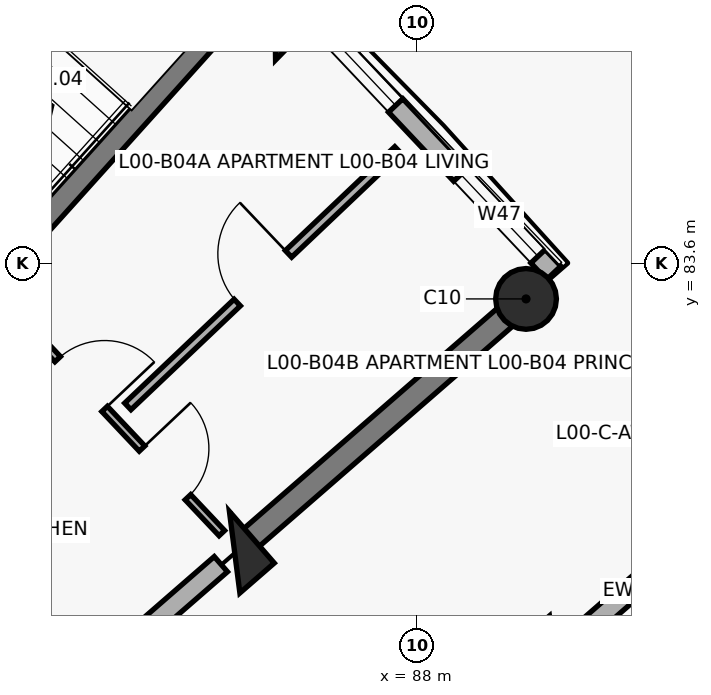
"""IFC4 building model, lengths in metres.
Left out: names, types, materials, properties, quantities, classifications, styles, units other than length and angle.
Written with IfcOpenShell. Run it as: python <this file> out.ifc"""

import sys

from ifc_helpers import new_model, si_unit, direction, frame, frame_2d, origin, origin_2d, place, context, subcontext, project, spatial, rectangle, circle, extrude, element, fill, save


model = new_model("IFC4")
c1 = context("Model", 3, precision=1e-05, world=origin(), true_north=direction((0.0, 1.0)))
c2 = subcontext(c1, "Body", "Model", "MODEL_VIEW")
j1 = project(units=[si_unit("LENGTHUNIT", "METRE"), si_unit("PLANEANGLEUNIT", "RADIAN")], contexts=[c1])
p1 = place(None, origin())
s1 = spatial("IfcSite", under=j1, at=p1, CompositionType="ELEMENT")
p2 = place(p1, origin())
s2 = spatial("IfcBuilding", under=s1, at=p2, CompositionType="ELEMENT")
p3 = place(p2, origin())
s3 = spatial("IfcBuildingStorey", under=s2, at=p3, CompositionType="ELEMENT", Elevation=0.0)
p4 = place(p3, frame((86.137, 86.626, 0.0), z_axis=(0.0, 0.0, 1.0), x_axis=(0.698665066769, 0.715448897181, 0.0)))
e1 = element("IfcColumn", 1, at=p4, inside=s3, PredefinedType="COLUMN", context=c2, shape_type="SweptSolid", body=[
    extrude(rectangle(XDim=0.5, YDim=0.5, at=origin_2d()), origin(), (0.0, 0.0, 1.0), 4.5),
])
p5 = place(p3, frame((85.603, 79.796, 0.0), z_axis=(0.0, 0.0, 1.0), x_axis=(0.754709580223, 0.656059028991, 0.0)))
e2 = element("IfcColumn", 2, at=p5, inside=s3, PredefinedType="COLUMN", context=c2, shape_type="SweptSolid", body=[
    extrude(rectangle(XDim=0.6, YDim=0.9, at=origin_2d()), origin(), (0.0, 0.0, 1.0), 4.5),
])
p6 = place(p3, frame((89.437, 83.129, 0.0), z_axis=(0.0, 0.0, 1.0), x_axis=(0.754709580223, 0.656059028991, 0.0)))
e3 = element("IfcColumn", 3, at=p6, inside=s3, PredefinedType="COLUMN", context=c2, shape_type="SweptSolid", body=[
    extrude(circle(Radius=0.4, at=origin_2d()), origin(), (0.0, 0.0, 1.0), 4.5),
])
p7 = place(p3, frame((85.739, 79.914, 0.0), z_axis=(0.0, 0.0, 1.0), x_axis=(0.754703505217, 0.65606601742, 0.0)))
e4 = element("IfcWall", 4, at=p7, inside=s3, PredefinedType="SHEAR", context=c2, shape_type="SweptSolid", body=[
    extrude(rectangle(XDim=4.72, YDim=0.31, at=frame_2d((2.36, 0.0))), origin(), (0.0, 0.0, 1.0), 4.26),
])
p8 = place(p3, frame((86.5, 86.969, 0.0), z_axis=(0.0, 0.0, 1.0), x_axis=(0.686350671901, -0.727270757821, 0.0)))
e5 = element("IfcWall", 5, at=p8, inside=s3, PredefinedType="SOLIDWALL", context=c2, shape_type="SweptSolid", body=[
    extrude(rectangle(XDim=4.809, YDim=0.258, at=frame_2d((2.404, 0.0))), origin(), (0.0, 0.0, 1.0), 3.45),
])
p9 = place(p8, frame((0.3, 0.0, 0.3)))
e6 = element("IfcOpeningElement", 6, at=p9, cuts=e5, PredefinedType="OPENING", context=c2, shape_type="SweptSolid", body=[
    extrude(rectangle(XDim=1.48, YDim=1.42, at=frame_2d((0.74, 0.71))), frame((0.0, 0.139, 0.0), z_axis=(0.0, -1.0, 0.0), x_axis=(1.0, 0.0, 0.0)), (0.0, 0.0, 1.0), 0.278),
])
p10 = place(p8, frame((3.029, 0.0, 0.3)))
e7 = element("IfcOpeningElement", 7, at=p10, cuts=e5, PredefinedType="OPENING", context=c2, shape_type="SweptSolid", body=[
    extrude(rectangle(XDim=1.48, YDim=1.42, at=frame_2d((0.74, 0.71))), frame((0.0, 0.139, 0.0), z_axis=(0.0, -1.0, 0.0), x_axis=(1.0, 0.0, 0.0)), (0.0, 0.0, 1.0), 0.278),
])
p11 = place(p3, frame((79.234, 74.259, 0.0), z_axis=(0.0, 0.0, 1.0), x_axis=(0.754717680958, 0.656049710044, 0.0)))
e8 = element("IfcWall", 8, at=p11, inside=s3, PredefinedType="SOLIDWALL", context=c2, shape_type="SweptSolid", body=[
    extrude(rectangle(XDim=8.2, YDim=0.265, at=frame_2d((4.1, 0.0))), origin(), (0.0, 0.0, 1.0), 3.34),
])
p12 = place(p11, frame((3.49, 0.0, 0.0)))
e9 = element("IfcOpeningElement", 9, at=p12, cuts=e8, PredefinedType="OPENING", context=c2, shape_type="SweptSolid", body=[
    extrude(rectangle(XDim=1.5, YDim=2.2, at=frame_2d((0.75, 1.1))), frame((0.0, 0.142, 0.0), z_axis=(0.0, -1.0, 0.0), x_axis=(1.0, 0.0, 0.0)), (0.0, 0.0, 1.0), 0.285),
])
p13 = place(p3, frame((91.746, 80.101, 0.0), z_axis=(0.0, 0.0, 1.0), x_axis=(-0.754704866158, -0.656064451862, 0.0)))
e10 = element("IfcWall", 10, at=p13, inside=s3, PredefinedType="SOLIDWALL", context=c2, shape_type="SweptSolid", body=[
    extrude(rectangle(XDim=8.2, YDim=0.265, at=frame_2d((4.1, 0.0))), origin(), (0.0, 0.0, 1.0), 3.34),
])
p14 = place(p13, frame((3.49, 0.0, 0.0)))
e11 = element("IfcOpeningElement", 11, at=p14, cuts=e10, PredefinedType="OPENING", context=c2, shape_type="SweptSolid", body=[
    extrude(rectangle(XDim=1.5, YDim=2.2, at=frame_2d((0.75, 1.1))), frame((0.0, 0.142, 0.0), z_axis=(0.0, -1.0, 0.0), x_axis=(1.0, 0.0, 0.0)), (0.0, 0.0, 1.0), 0.285),
])
p15 = place(p3, frame((80.309, 81.073, 0.0), z_axis=(0.0, 0.0, 1.0), x_axis=(0.668885797871, 0.743365179038, 0.0)))
e12 = element("IfcWall", 12, at=p15, inside=s3, PredefinedType="SHEAR", context=c2, shape_type="SweptSolid", body=[
    extrude(rectangle(XDim=7.69, YDim=0.3, at=frame_2d((3.845, 0.0))), origin(), (0.0, 0.0, 1.0), 4.5),
])
p16 = place(p3, frame((82.829, 82.809, 0.0), z_axis=(0.0, 0.0, 1.0), x_axis=(0.686300649561, -0.727317962388, 0.0)))
e13 = element("IfcWall", 13, at=p16, inside=s3, PredefinedType="PARTITIONING", context=c2, shape_type="SweptSolid", body=[
    extrude(rectangle(XDim=3.797, YDim=0.1, at=frame_2d((1.899, 0.0))), origin(), (0.0, 0.0, 1.0), 3.34),
])
p17 = place(p16, frame((0.65, 0.0, 0.0)))
e14 = element("IfcOpeningElement", 14, at=p17, cuts=e13, PredefinedType="OPENING", context=c2, shape_type="SweptSolid", body=[
    extrude(rectangle(XDim=0.9, YDim=2.1, at=frame_2d((0.45, 1.05))), frame((0.0, 0.06, 0.0), z_axis=(0.0, -1.0, 0.0), x_axis=(1.0, 0.0, 0.0)), (0.0, 0.0, 1.0), 0.12),
])
p18 = place(p16, frame((2.267, 0.0, 0.0)))
e15 = element("IfcOpeningElement", 15, at=p18, cuts=e13, PredefinedType="OPENING", context=c2, shape_type="SweptSolid", body=[
    extrude(rectangle(XDim=0.88, YDim=2.1, at=frame_2d((0.44, 1.05))), frame((0.0, 0.06, 0.0), z_axis=(0.0, -1.0, 0.0), x_axis=(1.0, 0.0, 0.0)), (0.0, 0.0, 1.0), 0.12),
])
p19 = place(p3, frame((84.198, 81.714, 0.0), z_axis=(0.0, 0.0, 1.0), x_axis=(0.725204659953, 0.688533369694, 0.0)))
e16 = element("IfcWall", 16, at=p19, inside=s3, PredefinedType="PARTITIONING", context=c2, shape_type="SweptSolid", body=[
    extrude(rectangle(XDim=4.9, YDim=0.12, at=frame_2d((2.45, 0.0))), origin(), (0.0, 0.0, 1.0), 3.34),
])
p20 = place(p19, frame((1.985, 0.0, 0.0)))
e17 = element("IfcOpeningElement", 17, at=p20, cuts=e16, PredefinedType="OPENING", context=c2, shape_type="SweptSolid", body=[
    extrude(rectangle(XDim=0.93, YDim=2.1, at=frame_2d((0.465, 1.05))), frame((0.0, 0.07, 0.0), z_axis=(0.0, -1.0, 0.0), x_axis=(1.0, 0.0, 0.0)), (0.0, 0.0, 1.0), 0.14),
])
p21 = place(p9, origin())
e18 = element("IfcWindow", 18, at=p21, inside=s3, PartitioningType="DOUBLE_PANEL_VERTICAL", PredefinedType="WINDOW", context=c2, shape_type="SweptSolid", body=[
    extrude(rectangle(XDim=1.48, YDim=1.42, at=frame_2d((0.74, 0.71))), frame((0.0, 0.03, 0.0), z_axis=(0.0, -1.0, 0.0), x_axis=(1.0, 0.0, 0.0)), (0.0, 0.0, 1.0), 0.06),
])
fill(e6, e18)
p22 = place(p10, origin())
e19 = element("IfcWindow", 19, at=p22, inside=s3, PartitioningType="DOUBLE_PANEL_VERTICAL", PredefinedType="WINDOW", context=c2, shape_type="SweptSolid", body=[
    extrude(rectangle(XDim=1.48, YDim=1.42, at=frame_2d((0.74, 0.71))), frame((0.0, 0.03, 0.0), z_axis=(0.0, -1.0, 0.0), x_axis=(1.0, 0.0, 0.0)), (0.0, 0.0, 1.0), 0.06),
])
fill(e7, e19)
p23 = place(p17, origin())
e20 = element("IfcDoor", 20, at=p23, inside=s3, OperationType="SINGLE_SWING_RIGHT", PredefinedType="DOOR", context=c2, shape_type="SweptSolid", body=[
    extrude(rectangle(XDim=0.9, YDim=2.1, at=frame_2d((0.45, 1.05))), frame((0.0, 0.025, 0.0), z_axis=(0.0, -1.0, 0.0), x_axis=(1.0, 0.0, 0.0)), (0.0, 0.0, 1.0), 0.05),
])
fill(e14, e20)
p24 = place(p18, origin())
e21 = element("IfcDoor", 21, at=p24, inside=s3, OperationType="SINGLE_SWING_LEFT", PredefinedType="DOOR", context=c2, shape_type="SweptSolid", body=[
    extrude(rectangle(XDim=0.88, YDim=2.1, at=frame_2d((0.44, 1.05))), frame((0.0, 0.025, 0.0), z_axis=(0.0, -1.0, 0.0), x_axis=(1.0, 0.0, 0.0)), (0.0, 0.0, 1.0), 0.05),
])
fill(e15, e21)
p25 = place(p20, origin())
e22 = element("IfcDoor", 22, at=p25, inside=s3, OperationType="SINGLE_SWING_RIGHT", PredefinedType="DOOR", context=c2, shape_type="SweptSolid", body=[
    extrude(rectangle(XDim=0.93, YDim=2.1, at=frame_2d((0.465, 1.05))), frame((0.0, 0.025, 0.0), z_axis=(0.0, -1.0, 0.0), x_axis=(1.0, 0.0, 0.0)), (0.0, 0.0, 1.0), 0.05),
])
fill(e17, e22)
save(model, sys.argv[1])
